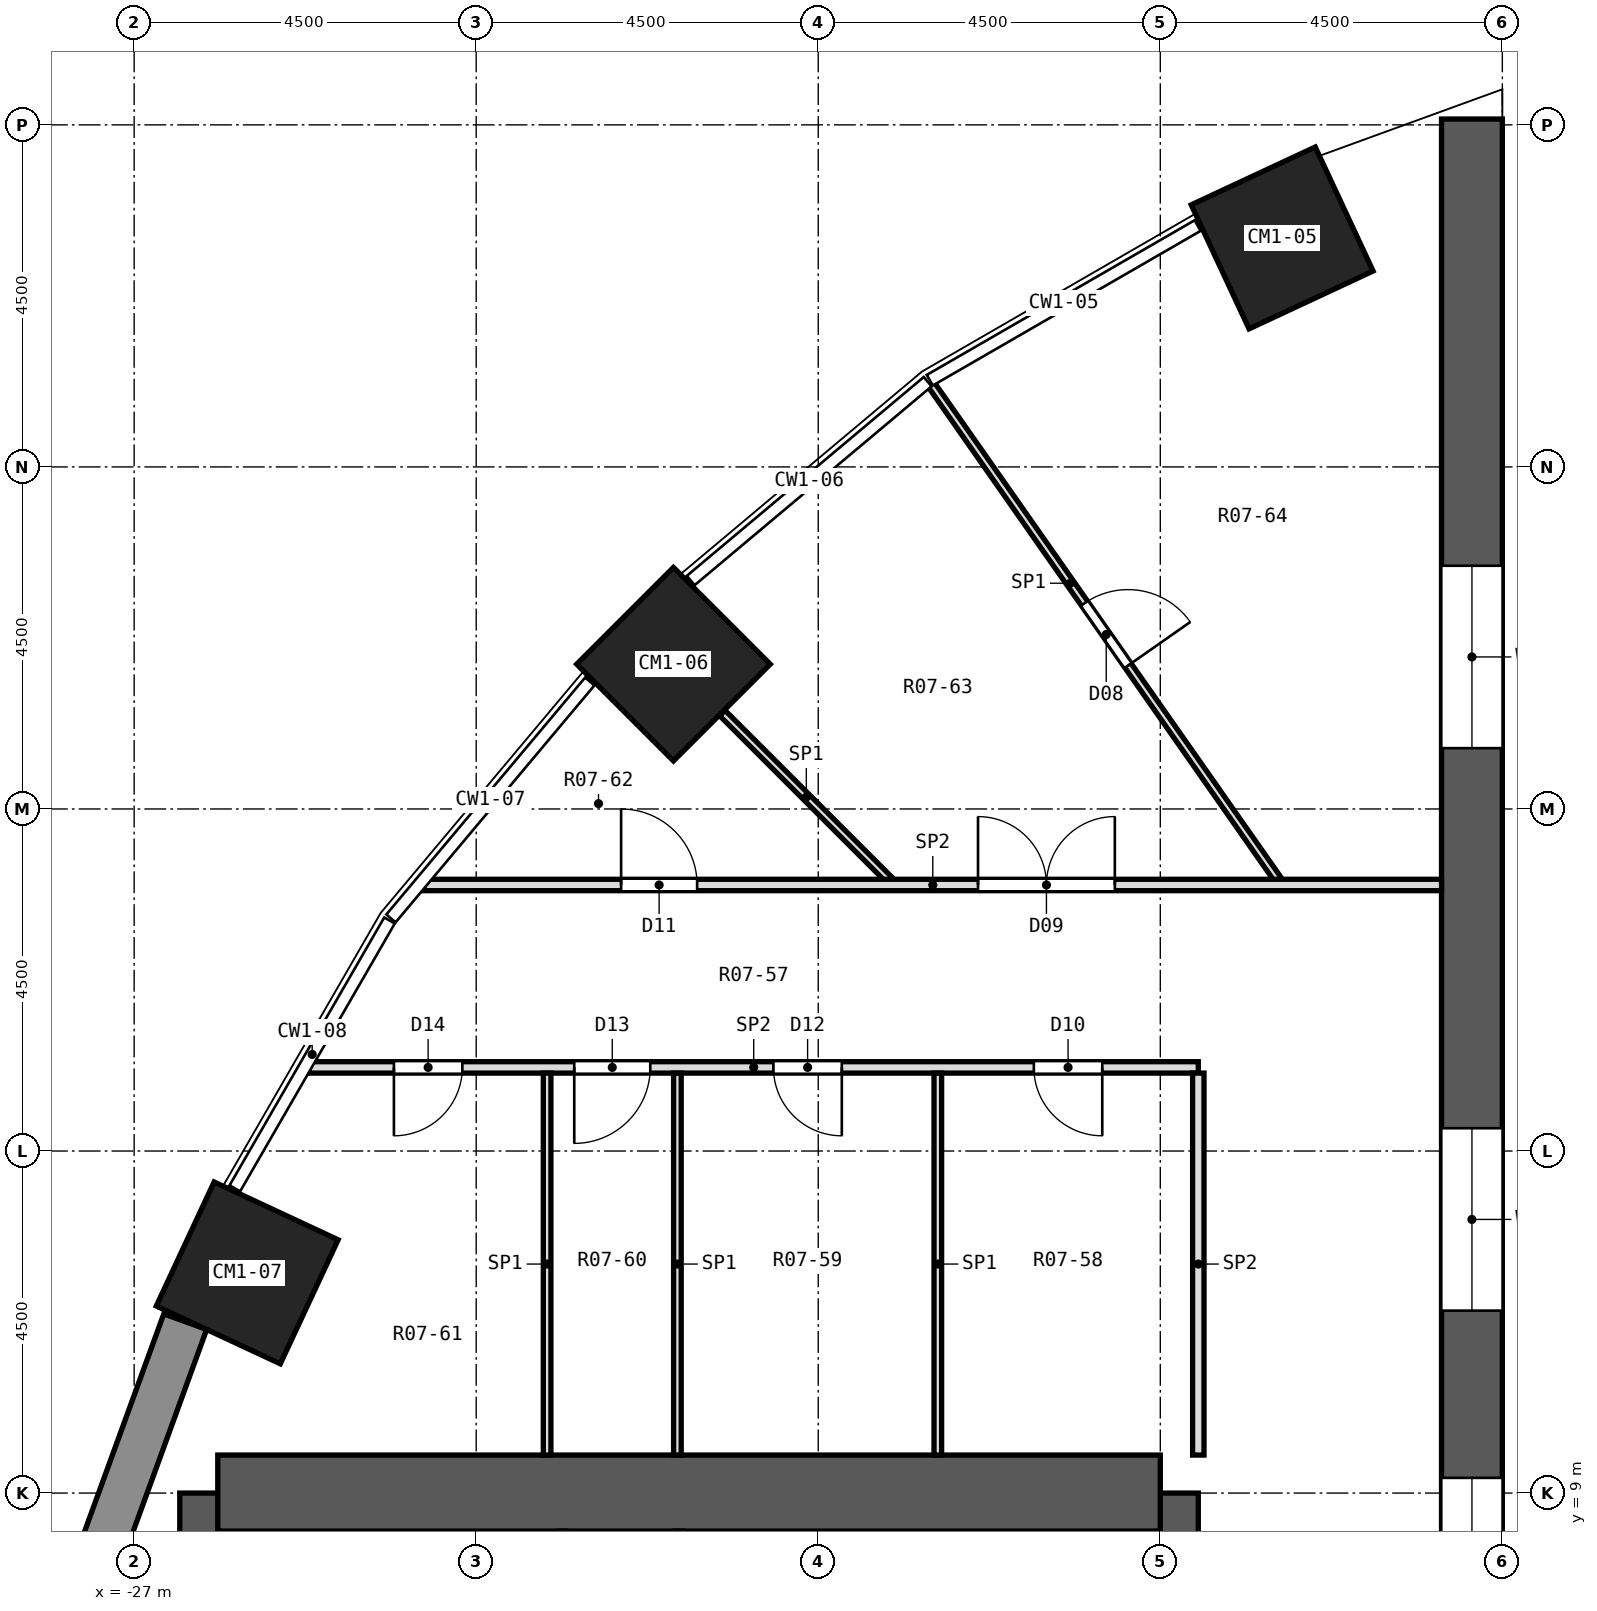
"""IFC4 building model, lengths in metres.
Left out: names, types, materials, properties, quantities, classifications, styles, units other than length and angle.
Written with IfcOpenShell. Run it as: python <this file> out.ifc"""

import sys

from ifc_helpers import new_model, si_unit, direction, frame, frame_2d, origin, origin_2d, place, context, subcontext, project, spatial, polyline, rectangle, outline, extrude, element, fill, save


model = new_model("IFC4")
c1 = context("Model", 3, precision=1e-05, world=origin(), true_north=direction((0.0, 1.0)))
c2 = subcontext(c1, "Body", "Model", "MODEL_VIEW")
j1 = project(units=[si_unit("LENGTHUNIT", "METRE"), si_unit("PLANEANGLEUNIT", "RADIAN")], contexts=[c1])
p1 = place(None, origin())
s1 = spatial("IfcSite", under=j1, at=p1, CompositionType="ELEMENT")
p2 = place(p1, origin())
s2 = spatial("IfcBuilding", under=s1, at=p2, CompositionType="ELEMENT")
p3 = place(p2, frame((0.0, 0.0, 17.6)))
s3 = spatial("IfcBuildingStorey", under=s2, at=p3, CompositionType="ELEMENT", Elevation=17.6)
for number, where, z_axis, x_axis in (
    (1, (-11.897, 25.512, 0.0), (0.0, 0.0, 1.0), (-0.423, 0.906, 0.0)),
    (2, (-19.905, 19.905, 0.0), (0.0, 0.0, 1.0), (-0.707, 0.707, 0.0)),
    (3, (-25.512, 11.897, 0.0), (0.0, 0.0, 1.0), (-0.906, 0.423, 0.0)),
):
    element("IfcColumn", number, at=place(p3, frame(where, z_axis=z_axis, x_axis=x_axis)), inside=s3, PredefinedType="COLUMN", context=c2, shape_type="SweptSolid", body=[
        extrude(rectangle(XDim=1.8, YDim=1.8, at=origin_2d()), origin(), (0.0, 0.0, 1.0), 4.2),
    ])
p4 = place(p3, frame((-13.5, -9.0, 0.0), z_axis=(0.0, 0.0, 1.0), x_axis=(0.0, 1.0, 0.0)))
e4 = element("IfcWall", 4, at=p4, inside=s3, PredefinedType="SHEAR", context=c2, shape_type="SweptSolid", body=[
    extrude(rectangle(XDim=18.0, YDim=1.0, at=frame_2d((9.0, 0.0))), origin(), (0.0, 0.0, 1.0), 4.2),
])
p5 = place(p4, frame((15.4, 0.0, 0.0)))
e5 = element("IfcOpeningElement", 5, at=p5, cuts=e4, PredefinedType="OPENING", context=c2, shape_type="SweptSolid", body=[
    extrude(rectangle(XDim=1.2, YDim=2.1, at=frame_2d((0.6, 1.05))), frame((0.0, 0.512, 0.0), z_axis=(0.0, -1.0, 0.0), x_axis=(1.0, 0.0, 0.0)), (0.0, 0.0, 1.0), 1.024),
])
p6 = place(p4, frame((1.4, 0.0, 0.0)))
e6 = element("IfcOpeningElement", 6, at=p6, cuts=e4, PredefinedType="OPENING", context=c2, shape_type="SweptSolid", body=[
    extrude(rectangle(XDim=1.2, YDim=2.1, at=frame_2d((0.6, 1.05))), frame((0.0, 0.512, 0.0), z_axis=(0.0, -1.0, 0.0), x_axis=(1.0, 0.0, 0.0)), (0.0, 0.0, 1.0), 1.024),
])
p7 = place(p4, frame((7.5, 0.0, 0.0)))
e7 = element("IfcOpeningElement", 7, at=p7, cuts=e4, PredefinedType="OPENING", context=c2, shape_type="SweptSolid", body=[
    extrude(rectangle(XDim=3.0, YDim=2.4, at=frame_2d((1.5, 1.2))), frame((0.0, 0.512, 0.0), z_axis=(0.0, -1.0, 0.0), x_axis=(1.0, 0.0, 0.0)), (0.0, 0.0, 1.0), 1.024),
])
p8 = place(p3, frame((-25.9, -9.0, 0.0), z_axis=(0.0, 0.0, 1.0), x_axis=(0.0, 1.0, 0.0)))
e8 = element("IfcWall", 8, at=p8, inside=s3, PredefinedType="SHEAR", context=c2, shape_type="SweptSolid", body=[
    extrude(rectangle(XDim=18.0, YDim=1.0, at=frame_2d((9.0, 0.0))), origin(), (0.0, 0.0, 1.0), 4.2),
])
p9 = place(p3, frame((-13.5, 9.0, 0.0), z_axis=(0.0, 0.0, 1.0), x_axis=(-1.0, 0.0, 0.0)))
e9 = element("IfcWall", 9, at=p9, inside=s3, PredefinedType="SHEAR", context=c2, shape_type="SweptSolid", body=[
    extrude(rectangle(XDim=12.4, YDim=1.0, at=frame_2d((6.2, 0.0))), origin(), (0.0, 0.0, 1.0), 4.2),
])
p10 = place(p3, frame((-9.4, -27.077, 0.0), z_axis=(0.0, 0.0, 1.0), x_axis=(0.0, 1.0, 0.0)))
e10 = element("IfcWall", 10, at=p10, inside=s3, PredefinedType="SHEAR", context=c2, shape_type="SweptSolid", body=[
    extrude(rectangle(XDim=54.154, YDim=0.8, at=frame_2d((27.077, 0.0))), origin(), (0.0, 0.0, 1.0), 4.2),
])
p11 = place(p10, frame((13.277, 0.0, 0.9)))
e11 = element("IfcOpeningElement", 11, at=p11, cuts=e10, PredefinedType="OPENING", context=c2, shape_type="SweptSolid", body=[
    extrude(rectangle(XDim=2.4, YDim=2.1, at=frame_2d((1.2, 1.05))), frame((0.0, 0.412, 0.0), z_axis=(0.0, -1.0, 0.0), x_axis=(1.0, 0.0, 0.0)), (0.0, 0.0, 1.0), 0.824),
])
p12 = place(p10, frame((17.877, 0.0, 0.9)))
e12 = element("IfcOpeningElement", 12, at=p12, cuts=e10, PredefinedType="OPENING", context=c2, shape_type="SweptSolid", body=[
    extrude(rectangle(XDim=2.4, YDim=2.1, at=frame_2d((1.2, 1.05))), frame((0.0, 0.412, 0.0), z_axis=(0.0, -1.0, 0.0), x_axis=(1.0, 0.0, 0.0)), (0.0, 0.0, 1.0), 0.824),
])
p13 = place(p10, frame((22.477, 0.0, 0.9)))
e13 = element("IfcOpeningElement", 13, at=p13, cuts=e10, PredefinedType="OPENING", context=c2, shape_type="SweptSolid", body=[
    extrude(rectangle(XDim=2.4, YDim=2.1, at=frame_2d((1.2, 1.05))), frame((0.0, 0.412, 0.0), z_axis=(0.0, -1.0, 0.0), x_axis=(1.0, 0.0, 0.0)), (0.0, 0.0, 1.0), 0.824),
])
p14 = place(p10, frame((29.277, 0.0, 0.9)))
e14 = element("IfcOpeningElement", 14, at=p14, cuts=e10, PredefinedType="OPENING", context=c2, shape_type="SweptSolid", body=[
    extrude(rectangle(XDim=2.4, YDim=2.1, at=frame_2d((1.2, 1.05))), frame((0.0, 0.412, 0.0), z_axis=(0.0, -1.0, 0.0), x_axis=(1.0, 0.0, 0.0)), (0.0, 0.0, 1.0), 0.824),
])
p15 = place(p10, frame((33.877, 0.0, 0.9)))
e15 = element("IfcOpeningElement", 15, at=p15, cuts=e10, PredefinedType="OPENING", context=c2, shape_type="SweptSolid", body=[
    extrude(rectangle(XDim=2.4, YDim=2.1, at=frame_2d((1.2, 1.05))), frame((0.0, 0.412, 0.0), z_axis=(0.0, -1.0, 0.0), x_axis=(1.0, 0.0, 0.0)), (0.0, 0.0, 1.0), 0.824),
])
p16 = place(p10, frame((38.477, 0.0, 0.9)))
e16 = element("IfcOpeningElement", 16, at=p16, cuts=e10, PredefinedType="OPENING", context=c2, shape_type="SweptSolid", body=[
    extrude(rectangle(XDim=2.4, YDim=2.1, at=frame_2d((1.2, 1.05))), frame((0.0, 0.412, 0.0), z_axis=(0.0, -1.0, 0.0), x_axis=(1.0, 0.0, 0.0)), (0.0, 0.0, 1.0), 0.824),
])
p17 = place(p10, frame((5.877, 0.0, 0.9)))
e17 = element("IfcOpeningElement", 17, at=p17, cuts=e10, PredefinedType="OPENING", context=c2, shape_type="SweptSolid", body=[
    extrude(rectangle(XDim=2.4, YDim=2.1, at=frame_2d((1.2, 1.05))), frame((0.0, 0.412, 0.0), z_axis=(0.0, -1.0, 0.0), x_axis=(1.0, 0.0, 0.0)), (0.0, 0.0, 1.0), 0.824),
])
p18 = place(p10, frame((45.877, 0.0, 0.9)))
e18 = element("IfcOpeningElement", 18, at=p18, cuts=e10, PredefinedType="OPENING", context=c2, shape_type="SweptSolid", body=[
    extrude(rectangle(XDim=2.4, YDim=2.1, at=frame_2d((1.2, 1.05))), frame((0.0, 0.412, 0.0), z_axis=(0.0, -1.0, 0.0), x_axis=(1.0, 0.0, 0.0)), (0.0, 0.0, 1.0), 0.824),
])
p19 = place(p3, frame((-26.328, 11.255, 0.0), z_axis=(0.0, 0.0, 1.0), x_axis=(-0.342034744565, -0.939687306241, 0.0)))
e19 = element("IfcWall", 19, at=p19, inside=s3, PredefinedType="SOLIDWALL", context=c2, shape_type="SweptSolid", body=[
    extrude(rectangle(XDim=4.099, YDim=0.6, at=frame_2d((2.05, 0.0))), origin(), (0.0, 0.0, 1.0), 3.6),
])
p20 = place(p3, frame((-8.109, 27.755, 0.0), z_axis=(-0.342019725657, 0.939690559381, 0.002039576307), x_axis=(0.000746014046, -0.001898944844, 0.999997918734)))
e20 = element("IfcWall", 20, at=p20, inside=s3, PredefinedType="SOLIDWALL", context=c2, shape_type="SweptSolid", body=[
    extrude(outline(polyline([(0.0, 0.0), (3.6, -1.084e-19), (3.6, -3.745), (-0.0, -3.745), (0.0, 0.0)])), origin(), (0.0, 0.0, -1.0), 0.38),
])
p21 = place(p3, frame((-16.519, 23.591, 0.0), z_axis=(0.0, 0.0, 1.0), x_axis=(0.573651437941, -0.819099522493, 0.0)))
e21 = element("IfcWall", 21, at=p21, inside=s3, PredefinedType="PARTITIONING", context=c2, shape_type="SweptSolid", body=[
    extrude(rectangle(XDim=7.971, YDim=0.1, at=frame_2d((3.986, 0.0))), origin(), (0.0, 0.0, 1.0), 3.6),
])
p22 = place(p21, frame((3.523, 0.0, 0.0)))
e22 = element("IfcOpeningElement", 22, at=p22, cuts=e21, PredefinedType="OPENING", context=c2, shape_type="SweptSolid", body=[
    extrude(rectangle(XDim=1.0, YDim=2.1, at=frame_2d((0.5, 1.05))), frame((0.0, 0.062, 0.0), z_axis=(0.0, -1.0, 0.0), x_axis=(1.0, 0.0, 0.0)), (0.0, 0.0, 1.0), 0.124),
])
p23 = place(p3, frame((-19.262, 19.262, 0.0), z_axis=(0.0, 0.0, 1.0), x_axis=(0.707263082415, -0.706950445402, 0.0)))
e23 = element("IfcWall", 23, at=p23, inside=s3, PredefinedType="PARTITIONING", context=c2, shape_type="SweptSolid", body=[
    extrude(rectangle(XDim=3.124, YDim=0.1, at=frame_2d((1.562, 0.0))), origin(), (0.0, 0.0, 1.0), 3.6),
])
p24 = place(p3, frame((-24.698, 14.6, 0.0), z_axis=(0.0, 0.0, 1.0), x_axis=(1.0, 0.0, 0.0)))
e24 = element("IfcWall", 24, at=p24, inside=s3, PredefinedType="PARTITIONING", context=c2, shape_type="SweptSolid", body=[
    extrude(rectangle(XDim=11.698, YDim=0.15, at=frame_2d((5.849, 0.0))), origin(), (0.0, 0.0, 1.0), 3.6),
])
p25 = place(p24, frame((9.534, 0.0, 0.0)))
e25 = element("IfcOpeningElement", 25, at=p25, cuts=e24, PredefinedType="OPENING", context=c2, shape_type="SweptSolid", body=[
    extrude(rectangle(XDim=0.9, YDim=2.1, at=frame_2d((0.45, 1.05))), frame((0.0, 0.087, 0.0), z_axis=(0.0, -1.0, 0.0), x_axis=(1.0, 0.0, 0.0)), (0.0, 0.0, 1.0), 0.174),
])
p26 = place(p24, frame((6.108, 0.0, 0.0)))
e26 = element("IfcOpeningElement", 26, at=p26, cuts=e24, PredefinedType="OPENING", context=c2, shape_type="SweptSolid", body=[
    extrude(rectangle(XDim=0.9, YDim=2.1, at=frame_2d((0.45, 1.05))), frame((0.0, 0.087, 0.0), z_axis=(0.0, -1.0, 0.0), x_axis=(1.0, 0.0, 0.0)), (0.0, 0.0, 1.0), 0.174),
])
p27 = place(p24, frame((3.488, 0.0, 0.0)))
e27 = element("IfcOpeningElement", 27, at=p27, cuts=e24, PredefinedType="OPENING", context=c2, shape_type="SweptSolid", body=[
    extrude(rectangle(XDim=1.0, YDim=2.1, at=frame_2d((0.5, 1.05))), frame((0.0, 0.087, 0.0), z_axis=(0.0, -1.0, 0.0), x_axis=(1.0, 0.0, 0.0)), (0.0, 0.0, 1.0), 0.174),
])
p28 = place(p24, frame((1.115, 0.0, 0.0)))
e28 = element("IfcOpeningElement", 28, at=p28, cuts=e24, PredefinedType="OPENING", context=c2, shape_type="SweptSolid", body=[
    extrude(rectangle(XDim=0.9, YDim=2.1, at=frame_2d((0.45, 1.05))), frame((0.0, 0.087, 0.0), z_axis=(0.0, -1.0, 0.0), x_axis=(1.0, 0.0, 0.0)), (0.0, 0.0, 1.0), 0.174),
])
p29 = place(p3, frame((-23.187, 17.0, 0.0), z_axis=(0.0, 0.0, 1.0), x_axis=(1.0, 0.0, 0.0)))
e29 = element("IfcWall", 29, at=p29, inside=s3, PredefinedType="PARTITIONING", context=c2, shape_type="SweptSolid", body=[
    extrude(rectangle(XDim=13.387, YDim=0.15, at=frame_2d((6.693, 0.0))), origin(), (0.0, 0.0, 1.0), 3.6),
])
p30 = place(p29, frame((7.289, 0.0, 0.0)))
e30 = element("IfcOpeningElement", 30, at=p30, cuts=e29, PredefinedType="OPENING", context=c2, shape_type="SweptSolid", body=[
    extrude(rectangle(XDim=1.8, YDim=2.1, at=frame_2d((0.9, 1.05))), frame((0.0, 0.087, 0.0), z_axis=(0.0, -1.0, 0.0), x_axis=(1.0, 0.0, 0.0)), (0.0, 0.0, 1.0), 0.174),
])
p31 = place(p29, frame((2.594, 0.0, 0.0)))
e31 = element("IfcOpeningElement", 31, at=p31, cuts=e29, PredefinedType="OPENING", context=c2, shape_type="SweptSolid", body=[
    extrude(rectangle(XDim=1.0, YDim=2.1, at=frame_2d((0.5, 1.05))), frame((0.0, 0.087, 0.0), z_axis=(0.0, -1.0, 0.0), x_axis=(1.0, 0.0, 0.0)), (0.0, 0.0, 1.0), 0.174),
])
p32 = place(p3, frame((-13.0, 9.5, 0.0), z_axis=(0.0, 0.0, 1.0), x_axis=(0.0, 1.0, 0.0)))
e32 = element("IfcWall", 32, at=p32, inside=s3, PredefinedType="PARTITIONING", context=c2, shape_type="SweptSolid", body=[
    extrude(rectangle(XDim=5.025, YDim=0.15, at=frame_2d((2.512, 0.0))), origin(), (0.0, 0.0, 1.0), 3.6),
])
for number, where, z_axis, x_axis in (
    (33, (-16.427, 9.5, 0.0), (0.0, 0.0, 1.0), (0.0, 1.0, 0.0)),
    (34, (-19.853, 9.5, 0.0), (0.0, 0.0, 1.0), (0.0, 1.0, 0.0)),
    (35, (-21.567, 9.5, 0.0), (0.0, 0.0, 1.0), (0.0, 1.0, 0.0)),
):
    element("IfcWall", number, at=place(p3, frame(where, z_axis=z_axis, x_axis=x_axis)), inside=s3, PredefinedType="PARTITIONING", context=c2, shape_type="SweptSolid", body=[
        extrude(rectangle(XDim=5.025, YDim=0.1, at=frame_2d((2.512, 0.0))), origin(), (0.0, 0.0, 1.0), 3.6),
    ])
p33 = place(p3, frame((-19.83, 5.3, 0.0), z_axis=(0.0, 0.0, 1.0), x_axis=(0.0, 1.0, 0.0)))
e36 = element("IfcWall", 36, at=p33, inside=s3, PredefinedType="PARTITIONING", context=c2, shape_type="SweptSolid", body=[
    extrude(rectangle(XDim=3.2, YDim=0.1, at=frame_2d((1.6, 0.0))), origin(), (0.0, 0.0, 1.0), 3.6),
])
p34 = place(p3, frame((-21.37, 5.3, 0.0), z_axis=(0.0, 0.0, 1.0), x_axis=(0.0, 1.0, 0.0)))
e37 = element("IfcWall", 37, at=p34, inside=s3, PredefinedType="PARTITIONING", context=c2, shape_type="SweptSolid", body=[
    extrude(rectangle(XDim=3.2, YDim=0.1, at=frame_2d((1.6, 0.0))), origin(), (0.0, 0.0, 1.0), 3.6),
])
p35 = place(p34, frame((1.15, 0.0, 0.0)))
e38 = element("IfcOpeningElement", 38, at=p35, cuts=e37, PredefinedType="OPENING", context=c2, shape_type="SweptSolid", body=[
    extrude(rectangle(XDim=0.9, YDim=2.1, at=frame_2d((0.45, 1.05))), frame((0.0, 0.062, 0.0), z_axis=(0.0, -1.0, 0.0), x_axis=(1.0, 0.0, 0.0)), (0.0, 0.0, 1.0), 0.124),
])
p36 = place(p22, origin())
e39 = element("IfcDoor", 39, at=p36, inside=s3, OperationType="SINGLE_SWING_RIGHT", PredefinedType="DOOR", context=c2, shape_type="SweptSolid", body=[
    extrude(rectangle(XDim=1.0, YDim=2.1, at=frame_2d((0.5, 1.05))), frame((0.0, 0.025, 0.0), z_axis=(0.0, -1.0, 0.0), x_axis=(1.0, 0.0, 0.0)), (0.0, 0.0, 1.0), 0.05),
])
fill(e22, e39)
p37 = place(p30, origin())
e40 = element("IfcDoor", 40, at=p37, inside=s3, OperationType="DOUBLE_DOOR_SINGLE_SWING", PredefinedType="DOOR", context=c2, shape_type="SweptSolid", body=[
    extrude(rectangle(XDim=1.8, YDim=2.1, at=frame_2d((0.9, 1.05))), frame((0.0, 0.025, 0.0), z_axis=(0.0, -1.0, 0.0), x_axis=(1.0, 0.0, 0.0)), (0.0, 0.0, 1.0), 0.05),
])
fill(e30, e40)
p38 = place(p25, frame((0.9, 0.0, 0.0), z_axis=(0.0, 0.0, 1.0), x_axis=(-1.0, 0.0, 0.0)))
e41 = element("IfcDoor", 41, at=p38, inside=s3, OperationType="SINGLE_SWING_LEFT", PredefinedType="DOOR", context=c2, shape_type="SweptSolid", body=[
    extrude(rectangle(XDim=0.9, YDim=2.1, at=frame_2d((0.45, 1.05))), frame((0.0, 0.025, 0.0), z_axis=(0.0, -1.0, 0.0), x_axis=(1.0, 0.0, 0.0)), (0.0, 0.0, 1.0), 0.05),
])
fill(e25, e41)
p39 = place(p31, origin())
e42 = element("IfcDoor", 42, at=p39, inside=s3, OperationType="SINGLE_SWING_LEFT", PredefinedType="DOOR", context=c2, shape_type="SweptSolid", body=[
    extrude(rectangle(XDim=1.0, YDim=2.1, at=frame_2d((0.5, 1.05))), frame((0.0, 0.025, 0.0), z_axis=(0.0, -1.0, 0.0), x_axis=(1.0, 0.0, 0.0)), (0.0, 0.0, 1.0), 0.05),
])
fill(e31, e42)
p40 = place(p26, frame((0.9, 0.0, 0.0), z_axis=(0.0, 0.0, 1.0), x_axis=(-1.0, 0.0, 0.0)))
e43 = element("IfcDoor", 43, at=p40, inside=s3, OperationType="SINGLE_SWING_LEFT", PredefinedType="DOOR", context=c2, shape_type="SweptSolid", body=[
    extrude(rectangle(XDim=0.9, YDim=2.1, at=frame_2d((0.45, 1.05))), frame((0.0, 0.025, 0.0), z_axis=(0.0, -1.0, 0.0), x_axis=(1.0, 0.0, 0.0)), (0.0, 0.0, 1.0), 0.05),
])
fill(e26, e43)
p41 = place(p27, frame((1.0, 0.0, 0.0), z_axis=(0.0, 0.0, 1.0), x_axis=(-1.0, 0.0, 0.0)))
e44 = element("IfcDoor", 44, at=p41, inside=s3, OperationType="SINGLE_SWING_RIGHT", PredefinedType="DOOR", context=c2, shape_type="SweptSolid", body=[
    extrude(rectangle(XDim=1.0, YDim=2.1, at=frame_2d((0.5, 1.05))), frame((0.0, 0.025, 0.0), z_axis=(0.0, -1.0, 0.0), x_axis=(1.0, 0.0, 0.0)), (0.0, 0.0, 1.0), 0.05),
])
fill(e27, e44)
p42 = place(p28, frame((0.9, 0.0, 0.0), z_axis=(0.0, 0.0, 1.0), x_axis=(-1.0, 0.0, 0.0)))
e45 = element("IfcDoor", 45, at=p42, inside=s3, OperationType="SINGLE_SWING_RIGHT", PredefinedType="DOOR", context=c2, shape_type="SweptSolid", body=[
    extrude(rectangle(XDim=0.9, YDim=2.1, at=frame_2d((0.45, 1.05))), frame((0.0, 0.025, 0.0), z_axis=(0.0, -1.0, 0.0), x_axis=(1.0, 0.0, 0.0)), (0.0, 0.0, 1.0), 0.05),
])
fill(e28, e45)
p43 = place(p15, origin())
e46 = element("IfcWindow", 46, at=p43, inside=s3, PartitioningType="SINGLE_PANEL", PredefinedType="WINDOW", context=c2, shape_type="SweptSolid", body=[
    extrude(rectangle(XDim=2.4, YDim=2.1, at=frame_2d((1.2, 1.05))), frame((0.0, 0.03, 0.0), z_axis=(0.0, -1.0, 0.0), x_axis=(1.0, 0.0, 0.0)), (0.0, 0.0, 1.0), 0.06),
])
fill(e15, e46)
p44 = place(p16, origin())
e47 = element("IfcWindow", 47, at=p44, inside=s3, PartitioningType="SINGLE_PANEL", PredefinedType="WINDOW", context=c2, shape_type="SweptSolid", body=[
    extrude(rectangle(XDim=2.4, YDim=2.1, at=frame_2d((1.2, 1.05))), frame((0.0, 0.03, 0.0), z_axis=(0.0, -1.0, 0.0), x_axis=(1.0, 0.0, 0.0)), (0.0, 0.0, 1.0), 0.06),
])
fill(e16, e47)
p45 = place(p18, origin())
e48 = element("IfcWindow", 48, at=p45, inside=s3, PartitioningType="SINGLE_PANEL", PredefinedType="WINDOW", context=c2, shape_type="SweptSolid", body=[
    extrude(rectangle(XDim=2.4, YDim=2.1, at=frame_2d((1.2, 1.05))), frame((0.0, 0.03, 0.0), z_axis=(0.0, -1.0, 0.0), x_axis=(1.0, 0.0, 0.0)), (0.0, 0.0, 1.0), 0.06),
])
fill(e18, e48)
save(model, sys.argv[1])
